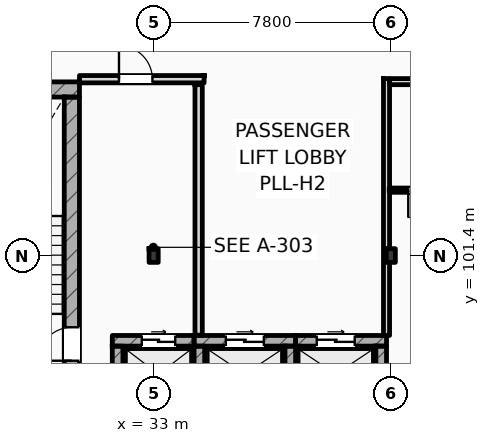
"""IFC4 building model, lengths in metres.
Left out: names, types, materials, properties, quantities, classifications, styles, units other than length and angle.
Written with IfcOpenShell. Run it as: python <this file> out.ifc"""

import sys

from ifc_helpers import new_model, si_unit, direction, frame, frame_2d, origin, origin_2d, place, context, subcontext, project, spatial, rectangle, i_section, extrude, element, fill, save


model = new_model("IFC4")
c1 = context("Model", 3, precision=1e-05, world=origin(), true_north=direction((0.0, 1.0)))
c2 = subcontext(c1, "Body", "Model", "MODEL_VIEW")
j1 = project(units=[si_unit("LENGTHUNIT", "METRE"), si_unit("PLANEANGLEUNIT", "RADIAN")], contexts=[c1])
p1 = place(None, origin())
s1 = spatial("IfcSite", under=j1, at=p1, CompositionType="ELEMENT")
p2 = place(p1, origin())
s2 = spatial("IfcBuilding", under=s1, at=p2, CompositionType="ELEMENT")
p3 = place(p2, frame((0.0, 0.0, 31.8)))
s3 = spatial("IfcBuildingStorey", under=s2, at=p3, CompositionType="ELEMENT", Elevation=31.8)
for number, where, z_axis, x_axis in (
    (1, (33.0, 101.4, 0.0), (0.0, 0.0, 1.0), (1.0, 0.0, 0.0)),
    (2, (40.8, 101.4, 0.0), (0.0, 0.0, 1.0), (1.0, 0.0, 0.0)),
):
    element("IfcColumn", number, at=place(p3, frame(where, z_axis=z_axis, x_axis=x_axis)), inside=s3, PredefinedType="COLUMN", context=c2, shape_type="SweptSolid", body=[
        extrude(i_section(OverallWidth=0.3, OverallDepth=0.45, WebThickness=0.014, FlangeThickness=0.026, FilletRadius=0.027, at=origin_2d()), origin(), (0.0, 0.0, 1.0), 3.6),
    ])
p4 = place(p3, frame((25.4, 106.862, 0.0), z_axis=(0.0, 0.0, 1.0), x_axis=(1.0, 0.0, 0.0)))
e3 = element("IfcWall", 3, at=p4, inside=s3, PredefinedType="SHEAR", context=c2, shape_type="SweptSolid", body=[
    extrude(rectangle(XDim=5.16, YDim=0.5, at=frame_2d((2.58, 0.0))), origin(), (0.0, 0.0, 1.0), 3.6),
])
p5 = place(p3, frame((30.31, 97.5, 0.0), z_axis=(0.0, 0.0, 1.0), x_axis=(0.0, 1.0, 0.0)))
e4 = element("IfcWall", 4, at=p5, inside=s3, PredefinedType="SHEAR", context=c2, shape_type="SweptSolid", body=[
    extrude(rectangle(XDim=9.112, YDim=0.5, at=frame_2d((4.556, 0.0))), origin(), (0.0, 0.0, 1.0), 3.6),
])
p6 = place(p5, frame((0.44, 0.0, 0.0)))
e5 = element("IfcOpeningElement", 5, at=p6, cuts=e4, PredefinedType="OPENING", context=c2, shape_type="SweptSolid", body=[
    extrude(rectangle(XDim=1.1, YDim=2.2, at=frame_2d((0.55, 1.1))), frame((0.0, 0.26, 0.0), z_axis=(0.0, -1.0, 0.0), x_axis=(1.0, 0.0, 0.0)), (0.0, 0.0, 1.0), 0.52),
])
p7 = place(p3, frame((31.64, 98.595, 0.0), z_axis=(0.0, 0.0, 1.0), x_axis=(1.0, 0.0, 0.0)))
e6 = element("IfcWall", 6, at=p7, inside=s3, PredefinedType="SHEAR", context=c2, shape_type="SweptSolid", body=[
    extrude(rectangle(XDim=2.69, YDim=0.35, at=frame_2d((1.345, 0.0))), origin(), (0.0, 0.0, 1.0), 3.36),
])
p8 = place(p7, frame((0.97, 0.0, 0.0)))
e7 = element("IfcOpeningElement", 7, at=p8, cuts=e6, PredefinedType="OPENING", context=c2, shape_type="SweptSolid", body=[
    extrude(rectangle(XDim=1.1, YDim=2.2, at=frame_2d((0.55, 1.1))), frame((0.0, 0.185, 0.0), z_axis=(0.0, -1.0, 0.0), x_axis=(1.0, 0.0, 0.0)), (0.0, 0.0, 1.0), 0.37),
])
p9 = place(p3, frame((31.815, 96.58, 0.0), z_axis=(0.0, 0.0, 1.0), x_axis=(0.0, 1.0, 0.0)))
e8 = element("IfcWall", 8, at=p9, inside=s3, PredefinedType="SHEAR", context=c2, shape_type="SweptSolid", body=[
    extrude(rectangle(XDim=1.84, YDim=0.35, at=frame_2d((0.92, 0.0))), origin(), (0.0, 0.0, 1.0), 3.36),
])
p10 = place(p3, frame((34.33, 98.595, 0.0), z_axis=(0.0, 0.0, 1.0), x_axis=(1.0, 0.0, 0.0)))
e9 = element("IfcWall", 9, at=p10, inside=s3, PredefinedType="SHEAR", context=c2, shape_type="SweptSolid", body=[
    extrude(rectangle(XDim=3.34, YDim=0.35, at=frame_2d((1.67, 0.0))), origin(), (0.0, 0.0, 1.0), 3.36),
])
p11 = place(p10, frame((1.045, 0.0, 0.0)))
e10 = element("IfcOpeningElement", 10, at=p11, cuts=e9, PredefinedType="OPENING", context=c2, shape_type="SweptSolid", body=[
    extrude(rectangle(XDim=1.25, YDim=2.25, at=frame_2d((0.625, 1.125))), frame((0.0, 0.185, 0.0), z_axis=(0.0, -1.0, 0.0), x_axis=(1.0, 0.0, 0.0)), (0.0, 0.0, 1.0), 0.37),
])
for number, where, z_axis, x_axis in (
    (11, (34.505, 96.58, 0.0), (0.0, 0.0, 1.0), (0.0, 1.0, 0.0)),
    (12, (37.495, 96.58, 0.0), (0.0, 0.0, 1.0), (0.0, 1.0, 0.0)),
):
    element("IfcWall", number, at=place(p3, frame(where, z_axis=z_axis, x_axis=x_axis)), inside=s3, PredefinedType="SHEAR", context=c2, shape_type="SweptSolid", body=[
        extrude(rectangle(XDim=1.84, YDim=0.35, at=frame_2d((0.92, 0.0))), origin(), (0.0, 0.0, 1.0), 3.36),
    ])
p12 = place(p3, frame((37.67, 98.595, 0.0), z_axis=(0.0, 0.0, 1.0), x_axis=(1.0, 0.0, 0.0)))
e13 = element("IfcWall", 13, at=p12, inside=s3, PredefinedType="SHEAR", context=c2, shape_type="SweptSolid", body=[
    extrude(rectangle(XDim=2.99, YDim=0.35, at=frame_2d((1.495, 0.0))), origin(), (0.0, 0.0, 1.0), 3.36),
])
p13 = place(p12, frame((0.695, 0.0, 0.0)))
e14 = element("IfcOpeningElement", 14, at=p13, cuts=e13, PredefinedType="OPENING", context=c2, shape_type="SweptSolid", body=[
    extrude(rectangle(XDim=1.25, YDim=2.25, at=frame_2d((0.625, 1.125))), frame((0.0, 0.185, 0.0), z_axis=(0.0, -1.0, 0.0), x_axis=(1.0, 0.0, 0.0)), (0.0, 0.0, 1.0), 0.37),
])
p14 = place(p3, frame((40.485, 96.58, 0.0), z_axis=(0.0, 0.0, 1.0), x_axis=(0.0, 1.0, 0.0)))
e15 = element("IfcWall", 15, at=p14, inside=s3, PredefinedType="SHEAR", context=c2, shape_type="SweptSolid", body=[
    extrude(rectangle(XDim=1.84, YDim=0.35, at=frame_2d((0.92, 0.0))), origin(), (0.0, 0.0, 1.0), 2.99),
])
p15 = place(p3, frame((34.48, 98.78, 0.0), z_axis=(0.0, 0.0, 1.0), x_axis=(0.0, 1.0, 0.0)))
e16 = element("IfcWall", 16, at=p15, inside=s3, PredefinedType="STANDARD", context=c2, shape_type="SweptSolid", body=[
    extrude(rectangle(XDim=8.24, YDim=0.24, at=frame_2d((4.12, 0.0))), origin(), (0.0, 0.0, 1.0), 3.36),
])
p16 = place(p3, frame((30.56, 107.2, 0.0), z_axis=(0.0, 0.0, 1.0), x_axis=(1.0, 0.0, 0.0)))
e17 = element("IfcWall", 17, at=p16, inside=s3, PredefinedType="STANDARD", context=c2, shape_type="SweptSolid", body=[
    extrude(rectangle(XDim=4.1, YDim=0.24, at=frame_2d((2.05, 0.0))), origin(), (0.0, 0.0, 1.0), 3.36),
])
p17 = place(p16, frame((1.3, 0.0, 0.0)))
e18 = element("IfcOpeningElement", 18, at=p17, cuts=e17, PredefinedType="OPENING", context=c2, shape_type="SweptSolid", body=[
    extrude(rectangle(XDim=1.1, YDim=2.2, at=frame_2d((0.55, 1.1))), frame((0.0, 0.13, 0.0), z_axis=(0.0, -1.0, 0.0), x_axis=(1.0, 0.0, 0.0)), (0.0, 0.0, 1.0), 0.26),
])
p18 = place(p3, frame((40.76, 107.12, 0.0), z_axis=(0.0, 0.0, 1.0), x_axis=(1.0, 0.0, 0.0)))
e19 = element("IfcWall", 19, at=p18, inside=s3, PredefinedType="PARTITIONING", context=c2, shape_type="SweptSolid", body=[
    extrude(rectangle(XDim=23.44, YDim=0.2, at=frame_2d((11.72, 0.0))), origin(), (0.0, 0.0, 1.0), 3.36),
])
p19 = place(p18, frame((2.429, 0.0, 0.0)))
e20 = element("IfcOpeningElement", 20, at=p19, cuts=e19, PredefinedType="OPENING", context=c2, shape_type="SweptSolid", body=[
    extrude(rectangle(XDim=0.96, YDim=2.2, at=frame_2d((0.48, 1.1))), frame((0.0, 0.11, 0.0), z_axis=(0.0, -1.0, 0.0), x_axis=(1.0, 0.0, 0.0)), (0.0, 0.0, 1.0), 0.22),
])
p20 = place(p18, frame((4.243, 0.0, 0.0)))
e21 = element("IfcOpeningElement", 21, at=p20, cuts=e19, PredefinedType="OPENING", context=c2, shape_type="SweptSolid", body=[
    extrude(rectangle(XDim=0.96, YDim=2.2, at=frame_2d((0.48, 1.1))), frame((0.0, 0.11, 0.0), z_axis=(0.0, -1.0, 0.0), x_axis=(1.0, 0.0, 0.0)), (0.0, 0.0, 1.0), 0.22),
])
p21 = place(p18, frame((10.301, 0.0, 0.0)))
e22 = element("IfcOpeningElement", 22, at=p21, cuts=e19, PredefinedType="OPENING", context=c2, shape_type="SweptSolid", body=[
    extrude(rectangle(XDim=0.96, YDim=2.2, at=frame_2d((0.48, 1.1))), frame((0.0, 0.11, 0.0), z_axis=(0.0, -1.0, 0.0), x_axis=(1.0, 0.0, 0.0)), (0.0, 0.0, 1.0), 0.22),
])
p22 = place(p18, frame((12.059, 0.0, 0.0)))
e23 = element("IfcOpeningElement", 23, at=p22, cuts=e19, PredefinedType="OPENING", context=c2, shape_type="SweptSolid", body=[
    extrude(rectangle(XDim=0.96, YDim=2.2, at=frame_2d((0.48, 1.1))), frame((0.0, 0.11, 0.0), z_axis=(0.0, -1.0, 0.0), x_axis=(1.0, 0.0, 0.0)), (0.0, 0.0, 1.0), 0.22),
])
p23 = place(p18, frame((18.118, 0.0, 0.0)))
e24 = element("IfcOpeningElement", 24, at=p23, cuts=e19, PredefinedType="OPENING", context=c2, shape_type="SweptSolid", body=[
    extrude(rectangle(XDim=0.96, YDim=2.2, at=frame_2d((0.48, 1.1))), frame((0.0, 0.11, 0.0), z_axis=(0.0, -1.0, 0.0), x_axis=(1.0, 0.0, 0.0)), (0.0, 0.0, 1.0), 0.22),
])
p24 = place(p18, frame((19.821, 0.0, 0.0)))
e25 = element("IfcOpeningElement", 25, at=p24, cuts=e19, PredefinedType="OPENING", context=c2, shape_type="SweptSolid", body=[
    extrude(rectangle(XDim=0.96, YDim=2.2, at=frame_2d((0.48, 1.1))), frame((0.0, 0.11, 0.0), z_axis=(0.0, -1.0, 0.0), x_axis=(1.0, 0.0, 0.0)), (0.0, 0.0, 1.0), 0.22),
])
p25 = place(p3, frame((40.66, 98.77, 0.0), z_axis=(0.0, 0.0, 1.0), x_axis=(0.0, 1.0, 0.0)))
e26 = element("IfcWall", 26, at=p25, inside=s3, PredefinedType="PARTITIONING", context=c2, shape_type="SweptSolid", body=[
    extrude(rectangle(XDim=8.45, YDim=0.2, at=frame_2d((4.225, 0.0))), origin(), (0.0, 0.0, 1.0), 2.99),
])
p26 = place(p3, frame((40.75, 103.55, 0.0), z_axis=(0.0, 0.0, 1.0), x_axis=(1.0, 0.0, 0.0)))
e27 = element("IfcWall", 27, at=p26, inside=s3, PredefinedType="PARTITIONING", context=c2, shape_type="SweptSolid", body=[
    extrude(rectangle(XDim=2.15, YDim=0.14, at=frame_2d((1.075, 0.0))), origin(), (0.0, 0.0, 1.0), 3.36),
])
p27 = place(p26, frame((0.625, 0.0, 0.0)))
e28 = element("IfcOpeningElement", 28, at=p27, cuts=e27, PredefinedType="OPENING", context=c2, shape_type="SweptSolid", body=[
    extrude(rectangle(XDim=0.9, YDim=2.1, at=frame_2d((0.45, 1.05))), frame((0.0, 0.08, 0.0), z_axis=(0.0, -1.0, 0.0), x_axis=(1.0, 0.0, 0.0)), (0.0, 0.0, 1.0), 0.16),
])
p28 = place(p6, origin())
e29 = element("IfcDoor", 29, at=p28, inside=s3, OperationType="SINGLE_SWING_LEFT", PredefinedType="DOOR", context=c2, shape_type="SweptSolid", body=[
    extrude(rectangle(XDim=1.1, YDim=2.2, at=frame_2d((0.55, 1.1))), frame((0.0, 0.025, 0.0), z_axis=(0.0, -1.0, 0.0), x_axis=(1.0, 0.0, 0.0)), (0.0, 0.0, 1.0), 0.05),
])
fill(e5, e29)
p29 = place(p8, origin())
e30 = element("IfcDoor", 30, at=p29, inside=s3, OperationType="SLIDING_TO_LEFT", PredefinedType="DOOR", context=c2, shape_type="SweptSolid", body=[
    extrude(rectangle(XDim=1.1, YDim=2.2, at=frame_2d((0.55, 1.1))), frame((0.0, 0.025, 0.0), z_axis=(0.0, -1.0, 0.0), x_axis=(1.0, 0.0, 0.0)), (0.0, 0.0, 1.0), 0.05),
])
fill(e7, e30)
p30 = place(p11, origin())
e31 = element("IfcDoor", 31, at=p30, inside=s3, OperationType="SLIDING_TO_LEFT", PredefinedType="DOOR", context=c2, shape_type="SweptSolid", body=[
    extrude(rectangle(XDim=1.25, YDim=2.25, at=frame_2d((0.625, 1.125))), frame((0.0, 0.025, 0.0), z_axis=(0.0, -1.0, 0.0), x_axis=(1.0, 0.0, 0.0)), (0.0, 0.0, 1.0), 0.05),
])
fill(e10, e31)
p31 = place(p13, origin())
e32 = element("IfcDoor", 32, at=p31, inside=s3, OperationType="SLIDING_TO_LEFT", PredefinedType="DOOR", context=c2, shape_type="SweptSolid", body=[
    extrude(rectangle(XDim=1.25, YDim=2.25, at=frame_2d((0.625, 1.125))), frame((0.0, 0.025, 0.0), z_axis=(0.0, -1.0, 0.0), x_axis=(1.0, 0.0, 0.0)), (0.0, 0.0, 1.0), 0.05),
])
fill(e14, e32)
p32 = place(p17, origin())
e33 = element("IfcDoor", 33, at=p32, inside=s3, OperationType="SINGLE_SWING_LEFT", PredefinedType="DOOR", context=c2, shape_type="SweptSolid", body=[
    extrude(rectangle(XDim=1.1, YDim=2.2, at=frame_2d((0.55, 1.1))), frame((0.0, 0.025, 0.0), z_axis=(0.0, -1.0, 0.0), x_axis=(1.0, 0.0, 0.0)), (0.0, 0.0, 1.0), 0.05),
])
fill(e18, e33)
p33 = place(p27, frame((0.9, 0.0, 0.0), z_axis=(0.0, 0.0, 1.0), x_axis=(-1.0, 0.0, 0.0)))
e34 = element("IfcDoor", 34, at=p33, inside=s3, OperationType="SINGLE_SWING_LEFT", PredefinedType="DOOR", context=c2, shape_type="SweptSolid", body=[
    extrude(rectangle(XDim=0.9, YDim=2.1, at=frame_2d((0.45, 1.05))), frame((0.0, 0.025, 0.0), z_axis=(0.0, -1.0, 0.0), x_axis=(1.0, 0.0, 0.0)), (0.0, 0.0, 1.0), 0.05),
])
fill(e28, e34)
save(model, sys.argv[1])
